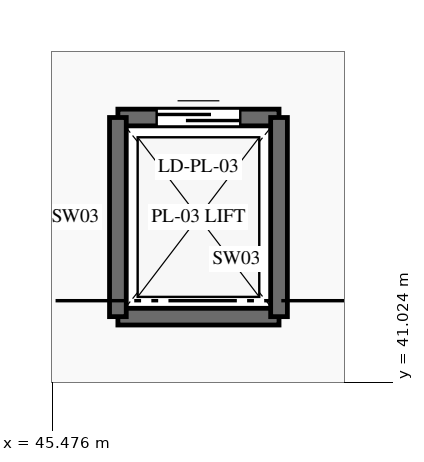
"""IFC4 building model, lengths in metres.
Left out: names, types, materials, properties, quantities, classifications, styles, units other than length and angle.
Written with IfcOpenShell. Run it as: python <this file> out.ifc"""

import sys

from ifc_helpers import new_model, si_unit, direction, frame, frame_2d, origin, place, context, subcontext, project, spatial, rectangle, extrude, element, fill, save


model = new_model("IFC4")
c1 = context("Model", 3, precision=1e-05, world=origin(), true_north=direction((0.0, 1.0)))
c2 = subcontext(c1, "Body", "Model", "MODEL_VIEW")
j1 = project(units=[si_unit("LENGTHUNIT", "METRE"), si_unit("PLANEANGLEUNIT", "RADIAN")], contexts=[c1])
p1 = place(None, origin())
s1 = spatial("IfcSite", under=j1, at=p1, CompositionType="ELEMENT")
p2 = place(p1, origin())
s2 = spatial("IfcBuilding", under=s1, at=p2, CompositionType="ELEMENT")
p3 = place(p2, frame((0.0, 0.0, 6.0)))
s3 = spatial("IfcBuildingStorey", under=s2, at=p3, CompositionType="ELEMENT", Elevation=6.0)
p4 = place(p3, frame((46.34, 41.89, 0.0), z_axis=(0.0, 0.0, 1.0), x_axis=(1.0, 0.0, 0.0)))
e1 = element("IfcWall", 1, at=p4, inside=s3, PredefinedType="SHEAR", context=c2, shape_type="SweptSolid", body=[
    extrude(rectangle(XDim=2.12, YDim=0.22, at=frame_2d((1.06, 0.0))), origin(), (0.0, 0.0, 1.0), 4.8),
])
p5 = place(p3, frame((46.34, 44.51, 0.0), z_axis=(0.0, 0.0, 1.0), x_axis=(1.0, 0.0, 0.0)))
e2 = element("IfcWall", 2, at=p5, inside=s3, PredefinedType="SHEAR", context=c2, shape_type="SweptSolid", body=[
    extrude(rectangle(XDim=2.12, YDim=0.22, at=frame_2d((1.06, 0.0))), origin(), (0.0, 0.0, 1.0), 4.8),
])
p6 = place(p5, frame((0.51, 0.0, 0.0)))
e3 = element("IfcOpeningElement", 3, at=p6, cuts=e2, PredefinedType="OPENING", context=c2, shape_type="SweptSolid", body=[
    extrude(rectangle(XDim=1.1, YDim=2.15, at=frame_2d((0.55, 1.075))), frame((0.0, 0.125, 0.0), z_axis=(0.0, -1.0, 0.0), x_axis=(1.0, 0.0, 0.0)), (0.0, 0.0, 1.0), 0.25),
])
for number, where, z_axis, x_axis in (
    (4, (46.34, 41.89, 0.0), (0.0, 0.0, 1.0), (0.0, 1.0, 0.0)),
    (5, (48.46, 41.89, 0.0), (0.0, 0.0, 1.0), (0.0, 1.0, 0.0)),
):
    element("IfcWall", number, at=place(p3, frame(where, z_axis=z_axis, x_axis=x_axis)), inside=s3, PredefinedType="SHEAR", context=c2, shape_type="SweptSolid", body=[
        extrude(rectangle(XDim=2.62, YDim=0.22, at=frame_2d((1.31, 0.0))), origin(), (0.0, 0.0, 1.0), 4.8),
    ])
p7 = place(p6, origin())
e6 = element("IfcDoor", 6, at=p7, inside=s3, OperationType="SLIDING_TO_RIGHT", PredefinedType="DOOR", context=c2, shape_type="SweptSolid", body=[
    extrude(rectangle(XDim=1.1, YDim=2.15, at=frame_2d((0.55, 1.075))), frame((0.0, 0.025, 0.0), z_axis=(0.0, -1.0, 0.0), x_axis=(1.0, 0.0, 0.0)), (0.0, 0.0, 1.0), 0.05),
])
fill(e3, e6)
save(model, sys.argv[1])
